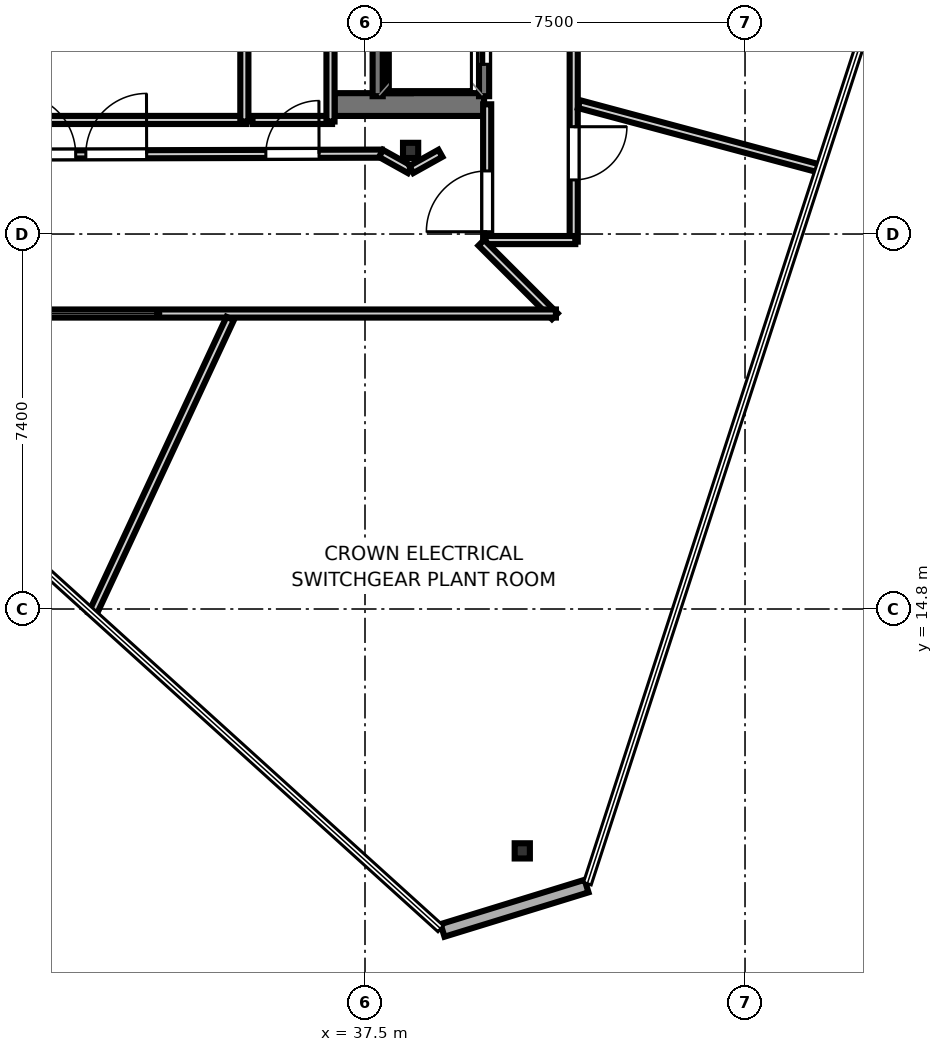
"""IFC4 building model, lengths in metres.
Left out: names, types, materials, properties, quantities, classifications, styles, units other than length and angle.
Written with IfcOpenShell. Run it as: python <this file> out.ifc"""

import sys

from ifc_helpers import new_model, si_unit, direction, frame, frame_2d, origin, origin_2d, place, context, subcontext, project, spatial, rectangle, i_section, extrude, element, fill, save


model = new_model("IFC4")
c1 = context("Model", 3, precision=1e-05, world=origin(), true_north=direction((0.0, 1.0)))
c2 = subcontext(c1, "Body", "Model", "MODEL_VIEW")
j1 = project(units=[si_unit("LENGTHUNIT", "METRE"), si_unit("PLANEANGLEUNIT", "RADIAN")], contexts=[c1])
p1 = place(None, origin())
s1 = spatial("IfcSite", under=j1, at=p1, CompositionType="ELEMENT")
p2 = place(p1, origin())
s2 = spatial("IfcBuilding", under=s1, at=p2, CompositionType="ELEMENT")
p3 = place(p2, frame((0.0, 0.0, 371.3)))
s3 = spatial("IfcBuildingStorey", under=s2, at=p3, CompositionType="ELEMENT", Elevation=371.3)
p4 = place(p3, frame((36.9, 24.755, 0.0), z_axis=(0.0, 0.0, 1.0), x_axis=(1.0, 0.0, 0.0)))
e1 = element("IfcWall", 1, at=p4, inside=s3, PredefinedType="SHEAR", context=c2, shape_type="SweptSolid", body=[
    extrude(rectangle(XDim=2.95, YDim=0.45, at=frame_2d((1.475, 0.0))), origin(), (0.0, 0.0, 1.0), 3.55),
])
p5 = place(p3, frame((38.18, 24.98, 0.0), z_axis=(0.0, 0.0, 1.0), x_axis=(0.0, 1.0, 0.0)))
e2 = element("IfcWall", 2, at=p5, inside=s3, PredefinedType="SHEAR", context=c2, shape_type="SweptSolid", body=[
    extrude(rectangle(XDim=7.44, YDim=0.45, at=frame_2d((3.72, 0.0))), origin(), (0.0, 0.0, 1.0), 3.55),
])
for number, where, z_axis, x_axis in (
    (3, (38.4, 23.85, 0.0), (0.0, 0.0, 1.0), (1.0, 0.0, 0.0)),
    (4, (40.604, 10.027, 0.0), (0.0, 0.0, 1.0), (1.0, 0.0, 0.0)),
):
    element("IfcColumn", number, at=place(p3, frame(where, z_axis=z_axis, x_axis=x_axis)), inside=s3, PredefinedType="COLUMN", context=c2, shape_type="SweptSolid", body=[
        extrude(i_section(OverallWidth=0.3, OverallDepth=0.3, WebThickness=0.01, FlangeThickness=0.015, at=origin_2d()), origin(), (0.0, 0.0, 1.0), 3.75),
    ])
p6 = place(p3, frame((39.031, 8.457, 0.0), z_axis=(0.0, 0.0, 1.0), x_axis=(0.955759481124, 0.294149306036, 0.0)))
e5 = element("IfcWall", 5, at=p6, inside=s3, PredefinedType="SOLIDWALL", context=c2, shape_type="SweptSolid", body=[
    extrude(rectangle(XDim=2.974, YDim=0.26, at=frame_2d((1.487, 0.0))), origin(), (0.0, 0.0, 1.0), 3.55),
])
p7 = place(p3, frame((39.85, 24.92, 0.0), z_axis=(0.0, 0.0, 1.0), x_axis=(0.0, 1.0, 0.0)))
e6 = element("IfcWall", 6, at=p7, inside=s3, PredefinedType="SOLIDWALL", context=c2, shape_type="SweptSolid", body=[
    extrude(rectangle(XDim=2.36, YDim=0.2, at=frame_2d((1.18, 0.0))), origin(), (0.0, 0.0, 1.0), 3.55),
])
p8 = place(p7, frame((0.63, 0.0, 0.0)))
e7 = element("IfcOpeningElement", 7, at=p8, cuts=e6, PredefinedType="OPENING", context=c2, shape_type="SweptSolid", body=[
    extrude(rectangle(XDim=1.1, YDim=2.15, at=frame_2d((0.55, 1.075))), frame((0.0, 0.11, 0.0), z_axis=(0.0, -1.0, 0.0), x_axis=(1.0, 0.0, 0.0)), (0.0, 0.0, 1.0), 0.22),
])
p9 = place(p3, frame((37.75, 24.92, 0.0), z_axis=(0.0, 0.0, 1.0), x_axis=(0.0, 1.0, 0.0)))
e8 = element("IfcWall", 8, at=p9, inside=s3, PredefinedType="SOLIDWALL", context=c2, shape_type="SweptSolid", body=[
    extrude(rectangle(XDim=2.36, YDim=0.2, at=frame_2d((1.18, 0.0))), origin(), (0.0, 0.0, 1.0), 3.55),
])
p10 = place(p3, frame((35.15, 24.451, 0.0), z_axis=(0.0, 0.0, 1.0), x_axis=(-1.0, 0.0, 0.0)))
e9 = element("IfcWall", 9, at=p10, inside=s3, PredefinedType="PARTITIONING", context=c2, shape_type="SweptSolid", body=[
    extrude(rectangle(XDim=5.55, YDim=0.16, at=frame_2d((2.775, 0.0))), origin(), (0.0, 0.0, 1.0), 2.87),
])
p11 = place(p3, frame((35.119, 29.38, 0.0), z_axis=(0.0, 0.0, 1.0), x_axis=(0.0, -1.0, 0.0)))
e10 = element("IfcWall", 10, at=p11, inside=s3, PredefinedType="PARTITIONING", context=c2, shape_type="SweptSolid", body=[
    extrude(rectangle(XDim=4.96, YDim=0.16, at=frame_2d((2.48, 0.0))), origin(), (0.0, 0.0, 1.0), 2.08),
])
p12 = place(p3, frame((39.911, 22.05, 0.0), z_axis=(0.0, 0.0, 1.0), x_axis=(0.0, 1.0, 0.0)))
e11 = element("IfcWall", 11, at=p12, inside=s3, PredefinedType="PARTITIONING", context=c2, shape_type="SweptSolid", body=[
    extrude(rectangle(XDim=2.71, YDim=0.16, at=frame_2d((1.355, 0.0))), origin(), (0.0, 0.0, 1.0), 2.87),
])
p13 = place(p12, frame((0.195, 0.0, 0.0)))
e12 = element("IfcOpeningElement", 12, at=p13, cuts=e11, PredefinedType="OPENING", context=c2, shape_type="SweptSolid", body=[
    extrude(rectangle(XDim=1.2, YDim=2.15, at=frame_2d((0.6, 1.075))), frame((0.0, 0.09, 0.0), z_axis=(0.0, -1.0, 0.0), x_axis=(1.0, 0.0, 0.0)), (0.0, 0.0, 1.0), 0.18),
])
p14 = place(p3, frame((41.619, 34.8, 0.0), z_axis=(0.0, 0.0, 1.0), x_axis=(0.0, -1.0, 0.0)))
e13 = element("IfcWall", 13, at=p14, inside=s3, PredefinedType="PARTITIONING", context=c2, shape_type="SweptSolid", body=[
    extrude(rectangle(XDim=12.75, YDim=0.16, at=frame_2d((6.375, 0.0))), origin(), (0.0, 0.0, 1.0), 2.87),
])
p15 = place(p14, frame((10.482, 0.0, 0.0)))
e14 = element("IfcOpeningElement", 14, at=p15, cuts=e13, PredefinedType="OPENING", context=c2, shape_type="SweptSolid", body=[
    extrude(rectangle(XDim=1.05, YDim=2.15, at=frame_2d((0.525, 1.075))), frame((0.0, 0.09, 0.0), z_axis=(0.0, -1.0, 0.0), x_axis=(1.0, 0.0, 0.0)), (0.0, 0.0, 1.0), 0.18),
])
p16 = place(p14, frame((5.059, 0.0, 0.0)))
e15 = element("IfcOpeningElement", 15, at=p16, cuts=e13, PredefinedType="OPENING", context=c2, shape_type="SweptSolid", body=[
    extrude(rectangle(XDim=1.05, YDim=2.15, at=frame_2d((0.525, 1.075))), frame((0.0, 0.09, 0.0), z_axis=(0.0, -1.0, 0.0), x_axis=(1.0, 0.0, 0.0)), (0.0, 0.0, 1.0), 0.18),
])
p17 = place(p3, frame((41.65, 22.081, 0.0), z_axis=(0.0, 0.0, 1.0), x_axis=(-1.0, 0.0, 0.0)))
e16 = element("IfcWall", 16, at=p17, inside=s3, PredefinedType="PARTITIONING", context=c2, shape_type="SweptSolid", body=[
    extrude(rectangle(XDim=1.77, YDim=0.16, at=frame_2d((0.885, 0.0))), origin(), (0.0, 0.0, 1.0), 2.87),
])
p18 = place(p3, frame((36.85, 24.451, 0.0), z_axis=(0.0, 0.0, 1.0), x_axis=(-1.0, 0.0, 0.0)))
e17 = element("IfcWall", 17, at=p18, inside=s3, PredefinedType="PARTITIONING", context=c2, shape_type="SweptSolid", body=[
    extrude(rectangle(XDim=1.57, YDim=0.16, at=frame_2d((0.785, 0.0))), origin(), (0.0, 0.0, 1.0), 2.87),
])
p19 = place(p3, frame((36.819, 29.38, 0.0), z_axis=(0.0, 0.0, 1.0), x_axis=(0.0, -1.0, 0.0)))
e18 = element("IfcWall", 18, at=p19, inside=s3, PredefinedType="PARTITIONING", context=c2, shape_type="SweptSolid", body=[
    extrude(rectangle(XDim=4.96, YDim=0.16, at=frame_2d((2.48, 0.0))), origin(), (0.0, 0.0, 1.0), 2.87),
])
p20 = place(p3, frame((29.136, 23.764, 0.0), z_axis=(0.0, 0.0, 1.0), x_axis=(0.999996877471, 0.002499009437, 0.0)))
e19 = element("IfcWall", 19, at=p20, inside=s3, PredefinedType="PARTITIONING", context=c2, shape_type="SweptSolid", body=[
    extrude(rectangle(XDim=8.695, YDim=0.16, at=frame_2d((4.347, 0.0))), origin(), (0.0, 0.0, 1.0), 2.87),
])
p21 = place(p20, frame((2.854, 0.0, 0.0)))
e20 = element("IfcOpeningElement", 20, at=p21, cuts=e19, PredefinedType="OPENING", context=c2, shape_type="SweptSolid", body=[
    extrude(rectangle(XDim=1.2, YDim=2.15, at=frame_2d((0.6, 1.075))), frame((0.0, 0.09, 0.0), z_axis=(0.0, -1.0, 0.0), x_axis=(1.0, 0.0, 0.0)), (0.0, 0.0, 1.0), 0.18),
])
p22 = place(p20, frame((6.407, 0.0, 0.0)))
e21 = element("IfcOpeningElement", 21, at=p22, cuts=e19, PredefinedType="OPENING", context=c2, shape_type="SweptSolid", body=[
    extrude(rectangle(XDim=1.05, YDim=2.15, at=frame_2d((0.525, 1.075))), frame((0.0, 0.09, 0.0), z_axis=(0.0, -1.0, 0.0), x_axis=(1.0, 0.0, 0.0)), (0.0, 0.0, 1.0), 0.18),
])
p23 = place(p20, frame((1.454, 0.0, 0.0)))
e22 = element("IfcOpeningElement", 22, at=p23, cuts=e19, PredefinedType="OPENING", context=c2, shape_type="SweptSolid", body=[
    extrude(rectangle(XDim=1.2, YDim=2.15, at=frame_2d((0.6, 1.075))), frame((0.0, 0.09, 0.0), z_axis=(0.0, -1.0, 0.0), x_axis=(1.0, 0.0, 0.0)), (0.0, 0.0, 1.0), 0.18),
])
p24 = place(p3, frame((37.816, 23.79, 0.0), z_axis=(0.0, 0.0, 1.0), x_axis=(0.873431330758, -0.486947338478, 0.0)))
e23 = element("IfcWall", 23, at=p24, inside=s3, PredefinedType="PARTITIONING", context=c2, shape_type="SweptSolid", body=[
    extrude(rectangle(XDim=0.651, YDim=0.16, at=frame_2d((0.326, 0.0))), origin(), (0.0, 0.0, 1.0), 2.87),
])
p25 = place(p3, frame((38.415, 23.473, 0.0), z_axis=(0.0, 0.0, 1.0), x_axis=(0.873120406102, 0.487504621976, 0.0)))
e24 = element("IfcWall", 24, at=p25, inside=s3, PredefinedType="PARTITIONING", context=c2, shape_type="SweptSolid", body=[
    extrude(rectangle(XDim=0.656, YDim=0.16, at=frame_2d((0.328, 0.0))), origin(), (0.0, 0.0, 1.0), 2.87),
])
p26 = place(p3, frame((39.796, 22.028, 0.0), z_axis=(0.0, 0.0, 1.0), x_axis=(0.707106781187, -0.707106781187, 0.0)))
e25 = element("IfcWall", 25, at=p26, inside=s3, PredefinedType="PARTITIONING", context=c2, shape_type="SweptSolid", body=[
    extrude(rectangle(XDim=2.051, YDim=0.16, at=frame_2d((1.025, 0.0))), origin(), (0.0, 0.0, 1.0), 2.87),
])
p27 = place(p3, frame((41.268, 20.631, 0.0), z_axis=(0.0, 0.0, 1.0), x_axis=(-1.0, 0.0, 0.0)))
e26 = element("IfcWall", 26, at=p27, inside=s3, PredefinedType="PARTITIONING", context=c2, shape_type="SweptSolid", body=[
    extrude(rectangle(XDim=15.702, YDim=0.16, at=frame_2d((7.851, 0.0))), origin(), (0.0, 0.0, 1.0), 2.87),
])
p28 = place(p3, frame((34.839, 20.533, 0.0), z_axis=(0.0, 0.0, 1.0), x_axis=(-0.4226199914, -0.906306980481, 0.0)))
e27 = element("IfcWall", 27, at=p28, inside=s3, PredefinedType="PARTITIONING", context=c2, shape_type="SweptSolid", body=[
    extrude(rectangle(XDim=6.445, YDim=0.16, at=frame_2d((3.222, 0.0))), origin(), (0.0, 0.0, 1.0), 2.87),
])
p29 = place(p3, frame((41.722, 24.764, 0.0), z_axis=(0.0, 0.0, 1.0), x_axis=(0.965929963901, -0.258803602832, 0.0)))
e28 = element("IfcWall", 28, at=p29, inside=s3, PredefinedType="PARTITIONING", context=c2, shape_type="SweptSolid", body=[
    extrude(rectangle(XDim=4.94, YDim=0.16, at=frame_2d((2.47, 0.0))), origin(), (0.0, 0.0, 1.0), 2.87),
])
p30 = place(p8, origin())
e29 = element("IfcDoor", 29, at=p30, inside=s3, OperationType="SLIDING_TO_LEFT", PredefinedType="DOOR", context=c2, shape_type="SweptSolid", body=[
    extrude(rectangle(XDim=1.1, YDim=2.15, at=frame_2d((0.55, 1.075))), frame((0.0, 0.025, 0.0), z_axis=(0.0, -1.0, 0.0), x_axis=(1.0, 0.0, 0.0)), (0.0, 0.0, 1.0), 0.05),
])
fill(e7, e29)
p31 = place(p21, origin())
e30 = element("IfcDoor", 30, at=p31, inside=s3, OperationType="SINGLE_SWING_RIGHT", PredefinedType="DOOR", context=c2, shape_type="SweptSolid", body=[
    extrude(rectangle(XDim=1.2, YDim=2.15, at=frame_2d((0.6, 1.075))), frame((0.0, 0.025, 0.0), z_axis=(0.0, -1.0, 0.0), x_axis=(1.0, 0.0, 0.0)), (0.0, 0.0, 1.0), 0.05),
])
fill(e20, e30)
p32 = place(p13, origin())
e31 = element("IfcDoor", 31, at=p32, inside=s3, OperationType="SINGLE_SWING_LEFT", PredefinedType="DOOR", context=c2, shape_type="SweptSolid", body=[
    extrude(rectangle(XDim=1.2, YDim=2.15, at=frame_2d((0.6, 1.075))), frame((0.0, 0.025, 0.0), z_axis=(0.0, -1.0, 0.0), x_axis=(1.0, 0.0, 0.0)), (0.0, 0.0, 1.0), 0.05),
])
fill(e12, e31)
p33 = place(p22, origin())
e32 = element("IfcDoor", 32, at=p33, inside=s3, OperationType="SINGLE_SWING_RIGHT", PredefinedType="DOOR", context=c2, shape_type="SweptSolid", body=[
    extrude(rectangle(XDim=1.05, YDim=2.15, at=frame_2d((0.525, 1.075))), frame((0.0, 0.025, 0.0), z_axis=(0.0, -1.0, 0.0), x_axis=(1.0, 0.0, 0.0)), (0.0, 0.0, 1.0), 0.05),
])
fill(e21, e32)
p34 = place(p23, origin())
e33 = element("IfcDoor", 33, at=p34, inside=s3, OperationType="SINGLE_SWING_LEFT", PredefinedType="DOOR", context=c2, shape_type="SweptSolid", body=[
    extrude(rectangle(XDim=1.2, YDim=2.15, at=frame_2d((0.6, 1.075))), frame((0.0, 0.025, 0.0), z_axis=(0.0, -1.0, 0.0), x_axis=(1.0, 0.0, 0.0)), (0.0, 0.0, 1.0), 0.05),
])
fill(e22, e33)
p35 = place(p15, origin())
e34 = element("IfcDoor", 34, at=p35, inside=s3, OperationType="SINGLE_SWING_LEFT", PredefinedType="DOOR", context=c2, shape_type="SweptSolid", body=[
    extrude(rectangle(XDim=1.05, YDim=2.15, at=frame_2d((0.525, 1.075))), frame((0.0, 0.025, 0.0), z_axis=(0.0, -1.0, 0.0), x_axis=(1.0, 0.0, 0.0)), (0.0, 0.0, 1.0), 0.05),
])
fill(e14, e34)
save(model, sys.argv[1])
